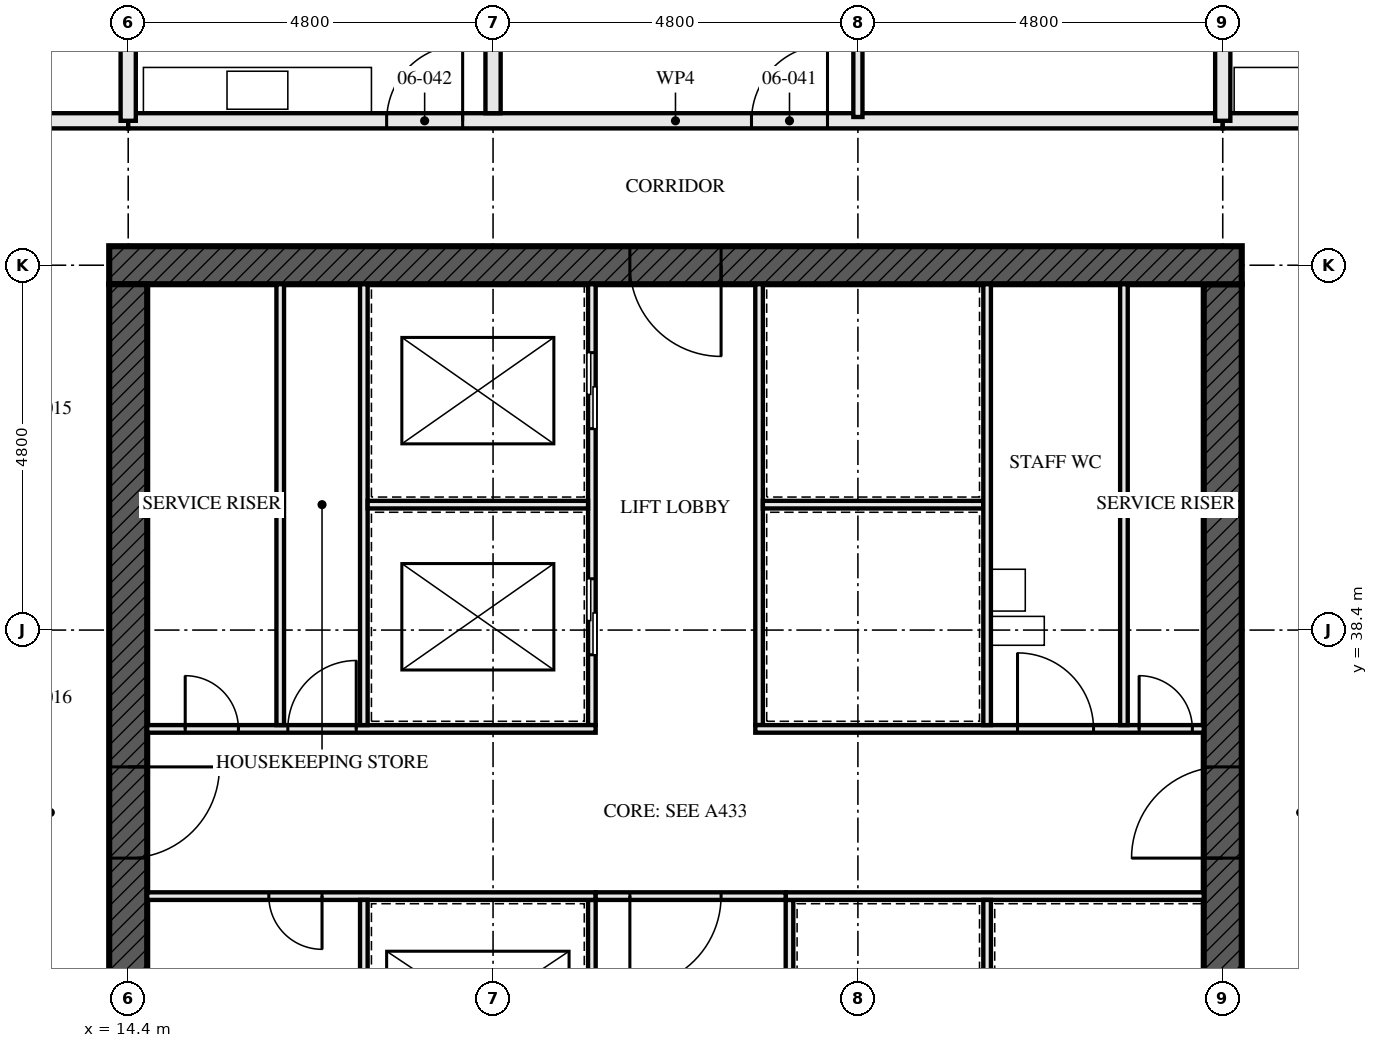
"""IFC4 building model, lengths in metres.
Left out: names, types, materials, properties, quantities, classifications, styles, units other than length and angle.
Written with IfcOpenShell. Run it as: python <this file> out.ifc"""

import sys

from ifc_helpers import new_model, si_unit, direction, frame, frame_2d, origin, place, context, subcontext, project, spatial, rectangle, extrude, element, fill, save


model = new_model("IFC4")
c1 = context("Model", 3, precision=1e-05, world=origin(), true_north=direction((0.0, 1.0)))
c2 = subcontext(c1, "Body", "Model", "MODEL_VIEW")
j1 = project(units=[si_unit("LENGTHUNIT", "METRE"), si_unit("PLANEANGLEUNIT", "RADIAN")], contexts=[c1])
p1 = place(None, origin())
s1 = spatial("IfcSite", under=j1, at=p1, CompositionType="ELEMENT")
p2 = place(p1, origin())
s2 = spatial("IfcBuilding", under=s1, at=p2, CompositionType="ELEMENT")
p3 = place(p2, frame((0.0, 0.0, 27.0)))
s3 = spatial("IfcBuildingStorey", under=s2, at=p3, CompositionType="ELEMENT", Elevation=27.0)
p4 = place(p3, frame((29.05, 43.2, -0.17), z_axis=(0.0, 0.0, 1.0), x_axis=(-1.0, 0.0, 0.0)))
e1 = element("IfcWall", 1, at=p4, inside=s3, PredefinedType="SHEAR", context=c2, shape_type="SweptSolid", body=[
    extrude(rectangle(XDim=14.9, YDim=0.5, at=frame_2d((7.45, 0.0))), origin(), (0.0, 0.0, 1.0), 3.5),
])
p5 = place(p4, frame((6.85, 0.0, 0.17)))
e2 = element("IfcOpeningElement", 2, at=p5, cuts=e1, PredefinedType="OPENING", context=c2, shape_type="SweptSolid", body=[
    extrude(rectangle(XDim=1.2, YDim=2.1, at=frame_2d((0.6, 1.05))), frame((0.0, 0.26, 0.0), z_axis=(0.0, -1.0, 0.0), x_axis=(1.0, 0.0, 0.0)), (0.0, 0.0, 1.0), 0.521),
])
p6 = place(p3, frame((14.4, 42.95, -0.17), z_axis=(0.0, 0.0, 1.0), x_axis=(0.0, -1.0, 0.0)))
e3 = element("IfcWall", 3, at=p6, inside=s3, PredefinedType="SHEAR", context=c2, shape_type="SweptSolid", body=[
    extrude(rectangle(XDim=13.9, YDim=0.5, at=frame_2d((6.95, 0.0))), origin(), (0.0, 0.0, 1.0), 3.5),
])
p7 = place(p6, frame((6.35, 0.0, 0.17)))
e4 = element("IfcOpeningElement", 4, at=p7, cuts=e3, PredefinedType="OPENING", context=c2, shape_type="SweptSolid", body=[
    extrude(rectangle(XDim=1.2, YDim=2.1, at=frame_2d((0.6, 1.05))), frame((0.0, 0.26, 0.0), z_axis=(0.0, -1.0, 0.0), x_axis=(1.0, 0.0, 0.0)), (0.0, 0.0, 1.0), 0.521),
])
p8 = place(p3, frame((28.8, 29.05, -0.17), z_axis=(0.0, 0.0, 1.0), x_axis=(0.0, 1.0, 0.0)))
e5 = element("IfcWall", 5, at=p8, inside=s3, PredefinedType="SHEAR", context=c2, shape_type="SweptSolid", body=[
    extrude(rectangle(XDim=13.9, YDim=0.5, at=frame_2d((6.95, 0.0))), origin(), (0.0, 0.0, 1.0), 3.5),
])
p9 = place(p8, frame((6.35, 0.0, 0.17)))
e6 = element("IfcOpeningElement", 6, at=p9, cuts=e5, PredefinedType="OPENING", context=c2, shape_type="SweptSolid", body=[
    extrude(rectangle(XDim=1.2, YDim=2.1, at=frame_2d((0.6, 1.05))), frame((0.0, 0.26, 0.0), z_axis=(0.0, -1.0, 0.0), x_axis=(1.0, 0.0, 0.0)), (0.0, 0.0, 1.0), 0.521),
])
p10 = place(p3, frame((14.4, 45.1, 0.0), z_axis=(0.0, 0.0, 1.0), x_axis=(-1.0, 0.0, 0.0)))
e7 = element("IfcWall", 7, at=p10, inside=s3, PredefinedType="PARTITIONING", context=c2, shape_type="SweptSolid", body=[
    extrude(rectangle(XDim=9.6, YDim=0.2, at=frame_2d((4.8, 0.0))), origin(), (0.0, 0.0, 1.0), 3.33),
])
p11 = place(p10, frame((5.2, 0.0, 0.0)))
e8 = element("IfcOpeningElement", 8, at=p11, cuts=e7, PredefinedType="OPENING", context=c2, shape_type="SweptSolid", body=[
    extrude(rectangle(XDim=1.0, YDim=2.1, at=frame_2d((0.5, 1.05))), frame((0.0, 0.111, 0.0), z_axis=(0.0, -1.0, 0.0), x_axis=(1.0, 0.0, 0.0)), (0.0, 0.0, 1.0), 0.221),
])
p12 = place(p3, frame((24.0, 51.2, 0.0), z_axis=(0.0, 0.0, 1.0), x_axis=(0.0, -1.0, 0.0)))
e9 = element("IfcWall", 9, at=p12, inside=s3, PredefinedType="PARTITIONING", context=c2, shape_type="SweptSolid", body=[
    extrude(rectangle(XDim=6.05, YDim=0.12, at=frame_2d((3.025, 0.0))), origin(), (0.0, 0.0, 1.0), 2.55),
])
p13 = place(p12, frame((2.575, 0.0, 0.0)))
e10 = element("IfcOpeningElement", 10, at=p13, cuts=e9, PredefinedType="OPENING", context=c2, shape_type="SweptSolid", body=[
    extrude(rectangle(XDim=0.9, YDim=2.1, at=frame_2d((0.45, 1.05))), frame((0.0, 0.071, 0.0), z_axis=(0.0, -1.0, 0.0), x_axis=(1.0, 0.0, 0.0)), (0.0, 0.0, 1.0), 0.141),
])
p14 = place(p3, frame((19.2, 57.255, 0.0), z_axis=(0.0, 0.0, 1.0), x_axis=(0.0, -1.0, 0.0)))
e11 = element("IfcWall", 11, at=p14, inside=s3, PredefinedType="PARTITIONING", context=c2, shape_type="SweptSolid", body=[
    extrude(rectangle(XDim=12.055, YDim=0.2, at=frame_2d((6.027, 0.0))), origin(), (0.0, 0.0, 1.0), 2.55),
])
p15 = place(p3, frame((28.8, 45.1, 0.0), z_axis=(0.0, 0.0, 1.0), x_axis=(-1.0, 0.0, 0.0)))
e12 = element("IfcWall", 12, at=p15, inside=s3, PredefinedType="PARTITIONING", context=c2, shape_type="SweptSolid", body=[
    extrude(rectangle(XDim=14.4, YDim=0.2, at=frame_2d((7.2, 0.0))), origin(), (0.0, 0.0, 1.0), 3.33),
])
p16 = place(p15, frame((5.2, 0.0, 0.0)))
e13 = element("IfcOpeningElement", 13, at=p16, cuts=e12, PredefinedType="OPENING", context=c2, shape_type="SweptSolid", body=[
    extrude(rectangle(XDim=1.0, YDim=2.1, at=frame_2d((0.5, 1.05))), frame((0.0, 0.111, 0.0), z_axis=(0.0, -1.0, 0.0), x_axis=(1.0, 0.0, 0.0)), (0.0, 0.0, 1.0), 0.221),
])
p17 = place(p15, frame((10.0, 0.0, 0.0)))
e14 = element("IfcOpeningElement", 14, at=p17, cuts=e12, PredefinedType="OPENING", context=c2, shape_type="SweptSolid", body=[
    extrude(rectangle(XDim=1.0, YDim=2.1, at=frame_2d((0.5, 1.05))), frame((0.0, 0.111, 0.0), z_axis=(0.0, -1.0, 0.0), x_axis=(1.0, 0.0, 0.0)), (0.0, 0.0, 1.0), 0.221),
])
p18 = place(p3, frame((38.4, 45.1, 0.0), z_axis=(0.0, 0.0, 1.0), x_axis=(-1.0, 0.0, 0.0)))
e15 = element("IfcWall", 15, at=p18, inside=s3, PredefinedType="PARTITIONING", context=c2, shape_type="SweptSolid", body=[
    extrude(rectangle(XDim=9.6, YDim=0.2, at=frame_2d((4.8, 0.0))), origin(), (0.0, 0.0, 1.0), 3.33),
])
p19 = place(p18, frame((0.4, 0.0, 0.0)))
e16 = element("IfcOpeningElement", 16, at=p19, cuts=e15, PredefinedType="OPENING", context=c2, shape_type="SweptSolid", body=[
    extrude(rectangle(XDim=1.0, YDim=2.1, at=frame_2d((0.5, 1.05))), frame((0.0, 0.111, 0.0), z_axis=(0.0, -1.0, 0.0), x_axis=(1.0, 0.0, 0.0)), (0.0, 0.0, 1.0), 0.221),
])
p20 = place(p18, frame((5.2, 0.0, 0.0)))
e17 = element("IfcOpeningElement", 17, at=p20, cuts=e15, PredefinedType="OPENING", context=c2, shape_type="SweptSolid", body=[
    extrude(rectangle(XDim=1.0, YDim=2.1, at=frame_2d((0.5, 1.05))), frame((0.0, 0.111, 0.0), z_axis=(0.0, -1.0, 0.0), x_axis=(1.0, 0.0, 0.0)), (0.0, 0.0, 1.0), 0.221),
])
for number, where, z_axis, x_axis in (
    (18, (16.4, 37.15, 0.0), (0.0, 0.0, 1.0), (0.0, 1.0, 0.0)),
    (19, (27.5, 37.15, 0.0), (0.0, 0.0, 1.0), (0.0, 1.0, 0.0)),
):
    element("IfcWall", number, at=place(p3, frame(where, z_axis=z_axis, x_axis=x_axis)), inside=s3, PredefinedType="SOLIDWALL", context=c2, shape_type="SweptSolid", body=[
        extrude(rectangle(XDim=5.8, YDim=0.1, at=frame_2d((2.9, 0.0))), origin(), (0.0, 0.0, 1.0), 3.33),
    ])
p21 = place(p3, frame((20.5, 29.05, 0.0), z_axis=(0.0, 0.0, 1.0), x_axis=(0.0, 1.0, 0.0)))
e20 = element("IfcWall", 20, at=p21, inside=s3, PredefinedType="SOLIDWALL", context=c2, shape_type="SweptSolid", body=[
    extrude(rectangle(XDim=5.8, YDim=0.1, at=frame_2d((2.9, 0.0))), origin(), (0.0, 0.0, 1.0), 3.33),
])
p22 = place(p21, frame((0.8, 0.0, 0.0)))
e21 = element("IfcOpeningElement", 21, at=p22, cuts=e20, PredefinedType="OPENING", context=c2, shape_type="SweptSolid", body=[
    extrude(rectangle(XDim=1.1, YDim=2.3, at=frame_2d((0.55, 1.15))), frame((0.0, 0.061, 0.0), z_axis=(0.0, -1.0, 0.0), x_axis=(1.0, 0.0, 0.0)), (0.0, 0.0, 1.0), 0.121),
])
p23 = place(p21, frame((3.775, 0.0, 0.0)))
e22 = element("IfcOpeningElement", 22, at=p23, cuts=e20, PredefinedType="OPENING", context=c2, shape_type="SweptSolid", body=[
    extrude(rectangle(XDim=1.1, YDim=2.3, at=frame_2d((0.55, 1.15))), frame((0.0, 0.061, 0.0), z_axis=(0.0, -1.0, 0.0), x_axis=(1.0, 0.0, 0.0)), (0.0, 0.0, 1.0), 0.121),
])
p24 = place(p3, frame((20.5, 37.15, 0.0), z_axis=(0.0, 0.0, 1.0), x_axis=(0.0, 1.0, 0.0)))
e23 = element("IfcWall", 23, at=p24, inside=s3, PredefinedType="SOLIDWALL", context=c2, shape_type="SweptSolid", body=[
    extrude(rectangle(XDim=5.8, YDim=0.1, at=frame_2d((2.9, 0.0))), origin(), (0.0, 0.0, 1.0), 3.33),
])
p25 = place(p24, frame((0.925, 0.0, 0.0)))
e24 = element("IfcOpeningElement", 24, at=p25, cuts=e23, PredefinedType="OPENING", context=c2, shape_type="SweptSolid", body=[
    extrude(rectangle(XDim=1.0, YDim=2.1, at=frame_2d((0.5, 1.05))), frame((0.0, 0.061, 0.0), z_axis=(0.0, -1.0, 0.0), x_axis=(1.0, 0.0, 0.0)), (0.0, 0.0, 1.0), 0.121),
])
p26 = place(p24, frame((3.9, 0.0, 0.0)))
e25 = element("IfcOpeningElement", 25, at=p26, cuts=e23, PredefinedType="OPENING", context=c2, shape_type="SweptSolid", body=[
    extrude(rectangle(XDim=1.0, YDim=2.1, at=frame_2d((0.5, 1.05))), frame((0.0, 0.061, 0.0), z_axis=(0.0, -1.0, 0.0), x_axis=(1.0, 0.0, 0.0)), (0.0, 0.0, 1.0), 0.121),
])
p27 = place(p3, frame((22.7, 37.15, 0.0), z_axis=(0.0, 0.0, 1.0), x_axis=(0.0, 1.0, 0.0)))
e26 = element("IfcWall", 26, at=p27, inside=s3, PredefinedType="SOLIDWALL", context=c2, shape_type="SweptSolid", body=[
    extrude(rectangle(XDim=5.8, YDim=0.1, at=frame_2d((2.9, 0.0))), origin(), (0.0, 0.0, 1.0), 3.33),
])
p28 = place(p3, frame((23.1, 29.05, 0.0), z_axis=(0.0, 0.0, 1.0), x_axis=(0.0, 1.0, 0.0)))
e27 = element("IfcWall", 27, at=p28, inside=s3, PredefinedType="SOLIDWALL", context=c2, shape_type="SweptSolid", body=[
    extrude(rectangle(XDim=5.8, YDim=0.1, at=frame_2d((2.9, 0.0))), origin(), (0.0, 0.0, 1.0), 3.33),
])
p29 = place(p28, frame((1.0, 0.0, 0.0)))
e28 = element("IfcOpeningElement", 28, at=p29, cuts=e27, PredefinedType="OPENING", context=c2, shape_type="SweptSolid", body=[
    extrude(rectangle(XDim=0.7, YDim=2.1, at=frame_2d((0.35, 1.05))), frame((0.0, 0.061, 0.0), z_axis=(0.0, -1.0, 0.0), x_axis=(1.0, 0.0, 0.0)), (0.0, 0.0, 1.0), 0.121),
])
p30 = place(p3, frame((14.65, 34.9, 0.0), z_axis=(0.0, 0.0, 1.0), x_axis=(1.0, 0.0, 0.0)))
e29 = element("IfcWall", 29, at=p30, inside=s3, PredefinedType="SOLIDWALL", context=c2, shape_type="SweptSolid", body=[
    extrude(rectangle(XDim=5.9, YDim=0.1, at=frame_2d((2.95, 0.0))), origin(), (0.0, 0.0, 1.0), 3.33),
])
p31 = place(p30, frame((1.6, 0.0, 0.0)))
e30 = element("IfcOpeningElement", 30, at=p31, cuts=e29, PredefinedType="OPENING", context=c2, shape_type="SweptSolid", body=[
    extrude(rectangle(XDim=0.7, YDim=2.1, at=frame_2d((0.35, 1.05))), frame((0.0, 0.061, 0.0), z_axis=(0.0, -1.0, 0.0), x_axis=(1.0, 0.0, 0.0)), (0.0, 0.0, 1.0), 0.121),
])
p32 = place(p3, frame((23.05, 34.9, 0.0), z_axis=(0.0, 0.0, 1.0), x_axis=(1.0, 0.0, 0.0)))
e31 = element("IfcWall", 31, at=p32, inside=s3, PredefinedType="SOLIDWALL", context=c2, shape_type="SweptSolid", body=[
    extrude(rectangle(XDim=5.5, YDim=0.1, at=frame_2d((2.75, 0.0))), origin(), (0.0, 0.0, 1.0), 3.33),
])
p33 = place(p3, frame((14.65, 37.1, 0.0), z_axis=(0.0, 0.0, 1.0), x_axis=(1.0, 0.0, 0.0)))
e32 = element("IfcWall", 32, at=p33, inside=s3, PredefinedType="SOLIDWALL", context=c2, shape_type="SweptSolid", body=[
    extrude(rectangle(XDim=5.9, YDim=0.1, at=frame_2d((2.95, 0.0))), origin(), (0.0, 0.0, 1.0), 3.33),
])
p34 = place(p33, frame((0.5, 0.0, 0.0)))
e33 = element("IfcOpeningElement", 33, at=p34, cuts=e32, PredefinedType="OPENING", context=c2, shape_type="SweptSolid", body=[
    extrude(rectangle(XDim=0.7, YDim=2.1, at=frame_2d((0.35, 1.05))), frame((0.0, 0.061, 0.0), z_axis=(0.0, -1.0, 0.0), x_axis=(1.0, 0.0, 0.0)), (0.0, 0.0, 1.0), 0.121),
])
p35 = place(p33, frame((1.85, 0.0, 0.0)))
e34 = element("IfcOpeningElement", 34, at=p35, cuts=e32, PredefinedType="OPENING", context=c2, shape_type="SweptSolid", body=[
    extrude(rectangle(XDim=0.9, YDim=2.1, at=frame_2d((0.45, 1.05))), frame((0.0, 0.061, 0.0), z_axis=(0.0, -1.0, 0.0), x_axis=(1.0, 0.0, 0.0)), (0.0, 0.0, 1.0), 0.121),
])
p36 = place(p3, frame((22.65, 37.1, 0.0), z_axis=(0.0, 0.0, 1.0), x_axis=(1.0, 0.0, 0.0)))
e35 = element("IfcWall", 35, at=p36, inside=s3, PredefinedType="SOLIDWALL", context=c2, shape_type="SweptSolid", body=[
    extrude(rectangle(XDim=5.9, YDim=0.1, at=frame_2d((2.95, 0.0))), origin(), (0.0, 0.0, 1.0), 3.33),
])
p37 = place(p36, frame((3.45, 0.0, 0.0)))
e36 = element("IfcOpeningElement", 36, at=p37, cuts=e35, PredefinedType="OPENING", context=c2, shape_type="SweptSolid", body=[
    extrude(rectangle(XDim=1.0, YDim=2.1, at=frame_2d((0.5, 1.05))), frame((0.0, 0.061, 0.0), z_axis=(0.0, -1.0, 0.0), x_axis=(1.0, 0.0, 0.0)), (0.0, 0.0, 1.0), 0.121),
])
p38 = place(p36, frame((5.05, 0.0, 0.0)))
e37 = element("IfcOpeningElement", 37, at=p38, cuts=e35, PredefinedType="OPENING", context=c2, shape_type="SweptSolid", body=[
    extrude(rectangle(XDim=0.7, YDim=2.1, at=frame_2d((0.35, 1.05))), frame((0.0, 0.061, 0.0), z_axis=(0.0, -1.0, 0.0), x_axis=(1.0, 0.0, 0.0)), (0.0, 0.0, 1.0), 0.121),
])
p39 = place(p3, frame((20.55, 34.9, 0.0), z_axis=(0.0, 0.0, 1.0), x_axis=(1.0, 0.0, 0.0)))
e38 = element("IfcWall", 38, at=p39, inside=s3, PredefinedType="SOLIDWALL", context=c2, shape_type="SweptSolid", body=[
    extrude(rectangle(XDim=2.5, YDim=0.1, at=frame_2d((1.25, 0.0))), origin(), (0.0, 0.0, 1.0), 3.33),
])
p40 = place(p39, frame((0.45, 0.0, 0.0)))
e39 = element("IfcOpeningElement", 39, at=p40, cuts=e38, PredefinedType="OPENING", context=c2, shape_type="SweptSolid", body=[
    extrude(rectangle(XDim=1.2, YDim=2.1, at=frame_2d((0.6, 1.05))), frame((0.0, 0.061, 0.0), z_axis=(0.0, -1.0, 0.0), x_axis=(1.0, 0.0, 0.0)), (0.0, 0.0, 1.0), 0.121),
])
for number, where, z_axis, x_axis in (
    (40, (17.5, 29.05, 0.0), (0.0, 0.0, 1.0), (0.0, 1.0, 0.0)),
    (41, (17.5, 37.15, 0.0), (0.0, 0.0, 1.0), (0.0, 1.0, 0.0)),
):
    element("IfcWall", number, at=place(p3, frame(where, z_axis=z_axis, x_axis=x_axis)), inside=s3, PredefinedType="SOLIDWALL", context=c2, shape_type="SweptSolid", body=[
        extrude(rectangle(XDim=5.8, YDim=0.1, at=frame_2d((2.9, 0.0))), origin(), (0.0, 0.0, 1.0), 3.33),
    ])
for number, where, z_axis, x_axis in (
    (42, (17.55, 40.05, 0.0), (0.0, 0.0, 1.0), (1.0, 0.0, 0.0)),
    (43, (22.75, 40.05, 0.0), (0.0, 0.0, 1.0), (1.0, 0.0, 0.0)),
):
    element("IfcWall", number, at=place(p3, frame(where, z_axis=z_axis, x_axis=x_axis)), inside=s3, PredefinedType="SOLIDWALL", context=c2, shape_type="SweptSolid", body=[
        extrude(rectangle(XDim=2.9, YDim=0.1, at=frame_2d((1.45, 0.0))), origin(), (0.0, 0.0, 1.0), 3.33),
    ])
p41 = place(p3, frame((25.7, 37.15, 0.0), z_axis=(0.0, 0.0, 1.0), x_axis=(0.0, 1.0, 0.0)))
e44 = element("IfcWall", 44, at=p41, inside=s3, PredefinedType="SOLIDWALL", context=c2, shape_type="SweptSolid", body=[
    extrude(rectangle(XDim=5.8, YDim=0.1, at=frame_2d((2.9, 0.0))), origin(), (0.0, 0.0, 1.0), 3.33),
])
p42 = place(p3, frame((25.7, 31.95, 0.0), z_axis=(0.0, 0.0, 1.0), x_axis=(0.0, 1.0, 0.0)))
e45 = element("IfcWall", 45, at=p42, inside=s3, PredefinedType="SOLIDWALL", context=c2, shape_type="SweptSolid", body=[
    extrude(rectangle(XDim=2.9, YDim=0.1, at=frame_2d((1.45, 0.0))), origin(), (0.0, 0.0, 1.0), 3.33),
])
for number, where, z_axis, x_axis in (
    (46, (14.4, 45.1, 0.0), (0.0, 0.0, 1.0), (0.0, 1.0, 0.0)),
    (47, (28.8, 45.1, 0.0), (0.0, 0.0, 1.0), (0.0, 1.0, 0.0)),
):
    element("IfcWall", number, at=place(p3, frame(where, z_axis=z_axis, x_axis=x_axis)), inside=s3, PredefinedType="PARTITIONING", context=c2, shape_type="SweptSolid", body=[
        extrude(rectangle(XDim=2.53, YDim=0.2, at=frame_2d((1.265, 0.0))), origin(), (0.0, 0.0, 1.0), 2.32),
    ])
p43 = place(p16, frame((1.0, 0.0, 0.0), z_axis=(0.0, 0.0, 1.0), x_axis=(-1.0, 0.0, 0.0)))
e48 = element("IfcDoor", 48, at=p43, inside=s3, OperationType="SINGLE_SWING_LEFT", PredefinedType="DOOR", context=c2, shape_type="SweptSolid", body=[
    extrude(rectangle(XDim=1.0, YDim=2.1, at=frame_2d((0.5, 1.05))), frame((0.0, 0.027, 0.0), z_axis=(0.0, -1.0, 0.0), x_axis=(1.0, 0.0, 0.0)), (0.0, 0.0, 1.0), 0.054),
])
fill(e13, e48)
p44 = place(p17, frame((1.0, 0.0, 0.0), z_axis=(0.0, 0.0, 1.0), x_axis=(-1.0, 0.0, 0.0)))
e49 = element("IfcDoor", 49, at=p44, inside=s3, OperationType="SINGLE_SWING_LEFT", PredefinedType="DOOR", context=c2, shape_type="SweptSolid", body=[
    extrude(rectangle(XDim=1.0, YDim=2.1, at=frame_2d((0.5, 1.05))), frame((0.0, 0.027, 0.0), z_axis=(0.0, -1.0, 0.0), x_axis=(1.0, 0.0, 0.0)), (0.0, 0.0, 1.0), 0.054),
])
fill(e14, e49)
p45 = place(p25, origin())
e50 = element("IfcDoor", 50, at=p45, inside=s3, OperationType="SLIDING_TO_LEFT", PredefinedType="DOOR", context=c2, shape_type="SweptSolid", body=[
    extrude(rectangle(XDim=1.0, YDim=2.1, at=frame_2d((0.5, 1.05))), frame((0.0, 0.05, 0.0), z_axis=(0.0, -1.0, 0.0), x_axis=(1.0, 0.0, 0.0)), (0.0, 0.0, 1.0), 0.1),
])
fill(e24, e50)
p46 = place(p26, origin())
e51 = element("IfcDoor", 51, at=p46, inside=s3, OperationType="SLIDING_TO_LEFT", PredefinedType="DOOR", context=c2, shape_type="SweptSolid", body=[
    extrude(rectangle(XDim=1.0, YDim=2.1, at=frame_2d((0.5, 1.05))), frame((0.0, 0.05, 0.0), z_axis=(0.0, -1.0, 0.0), x_axis=(1.0, 0.0, 0.0)), (0.0, 0.0, 1.0), 0.1),
])
fill(e25, e51)
p47 = place(p31, frame((0.7, 0.0, 0.0), z_axis=(0.0, 0.0, 1.0), x_axis=(-1.0, 0.0, 0.0)))
e52 = element("IfcDoor", 52, at=p47, inside=s3, OperationType="SINGLE_SWING_RIGHT", PredefinedType="DOOR", context=c2, shape_type="SweptSolid", body=[
    extrude(rectangle(XDim=0.7, YDim=2.1, at=frame_2d((0.35, 1.05))), frame((0.0, 0.027, 0.0), z_axis=(0.0, -1.0, 0.0), x_axis=(1.0, 0.0, 0.0)), (0.0, 0.0, 1.0), 0.054),
])
fill(e30, e52)
p48 = place(p34, origin())
e53 = element("IfcDoor", 53, at=p48, inside=s3, OperationType="SINGLE_SWING_RIGHT", PredefinedType="DOOR", context=c2, shape_type="SweptSolid", body=[
    extrude(rectangle(XDim=0.7, YDim=2.1, at=frame_2d((0.35, 1.05))), frame((0.0, 0.027, 0.0), z_axis=(0.0, -1.0, 0.0), x_axis=(1.0, 0.0, 0.0)), (0.0, 0.0, 1.0), 0.054),
])
fill(e33, e53)
p49 = place(p35, origin())
e54 = element("IfcDoor", 54, at=p49, inside=s3, OperationType="SINGLE_SWING_LEFT", PredefinedType="DOOR", context=c2, shape_type="SweptSolid", body=[
    extrude(rectangle(XDim=0.9, YDim=2.1, at=frame_2d((0.45, 1.05))), frame((0.0, 0.027, 0.0), z_axis=(0.0, -1.0, 0.0), x_axis=(1.0, 0.0, 0.0)), (0.0, 0.0, 1.0), 0.054),
])
fill(e34, e54)
p50 = place(p37, origin())
e55 = element("IfcDoor", 55, at=p50, inside=s3, OperationType="SINGLE_SWING_RIGHT", PredefinedType="DOOR", context=c2, shape_type="SweptSolid", body=[
    extrude(rectangle(XDim=1.0, YDim=2.1, at=frame_2d((0.5, 1.05))), frame((0.0, 0.027, 0.0), z_axis=(0.0, -1.0, 0.0), x_axis=(1.0, 0.0, 0.0)), (0.0, 0.0, 1.0), 0.054),
])
fill(e36, e55)
p51 = place(p38, origin())
e56 = element("IfcDoor", 56, at=p51, inside=s3, OperationType="SINGLE_SWING_RIGHT", PredefinedType="DOOR", context=c2, shape_type="SweptSolid", body=[
    extrude(rectangle(XDim=0.7, YDim=2.1, at=frame_2d((0.35, 1.05))), frame((0.0, 0.027, 0.0), z_axis=(0.0, -1.0, 0.0), x_axis=(1.0, 0.0, 0.0)), (0.0, 0.0, 1.0), 0.054),
])
fill(e37, e56)
p52 = place(p40, frame((1.2, 0.0, 0.0), z_axis=(0.0, 0.0, 1.0), x_axis=(-1.0, 0.0, 0.0)))
e57 = element("IfcDoor", 57, at=p52, inside=s3, OperationType="SINGLE_SWING_LEFT", PredefinedType="DOOR", context=c2, shape_type="SweptSolid", body=[
    extrude(rectangle(XDim=1.2, YDim=2.1, at=frame_2d((0.6, 1.05))), frame((0.0, 0.027, 0.0), z_axis=(0.0, -1.0, 0.0), x_axis=(1.0, 0.0, 0.0)), (0.0, 0.0, 1.0), 0.054),
])
fill(e39, e57)
p53 = place(p7, origin())
e58 = element("IfcDoor", 58, at=p53, inside=s3, OperationType="SINGLE_SWING_LEFT", PredefinedType="DOOR", context=c2, shape_type="SweptSolid", body=[
    extrude(rectangle(XDim=1.2, YDim=2.1, at=frame_2d((0.6, 1.05))), frame((0.0, 0.027, 0.0), z_axis=(0.0, -1.0, 0.0), x_axis=(1.0, 0.0, 0.0)), (0.0, 0.0, 1.0), 0.054),
])
fill(e4, e58)
p54 = place(p9, origin())
e59 = element("IfcDoor", 59, at=p54, inside=s3, OperationType="SINGLE_SWING_LEFT", PredefinedType="DOOR", context=c2, shape_type="SweptSolid", body=[
    extrude(rectangle(XDim=1.2, YDim=2.1, at=frame_2d((0.6, 1.05))), frame((0.0, 0.027, 0.0), z_axis=(0.0, -1.0, 0.0), x_axis=(1.0, 0.0, 0.0)), (0.0, 0.0, 1.0), 0.054),
])
fill(e6, e59)
p55 = place(p5, origin())
e60 = element("IfcDoor", 60, at=p55, inside=s3, OperationType="SINGLE_SWING_LEFT", PredefinedType="DOOR", context=c2, shape_type="SweptSolid", body=[
    extrude(rectangle(XDim=1.2, YDim=2.1, at=frame_2d((0.6, 1.05))), frame((0.0, 0.027, 0.0), z_axis=(0.0, -1.0, 0.0), x_axis=(1.0, 0.0, 0.0)), (0.0, 0.0, 1.0), 0.054),
])
fill(e2, e60)
save(model, sys.argv[1])
